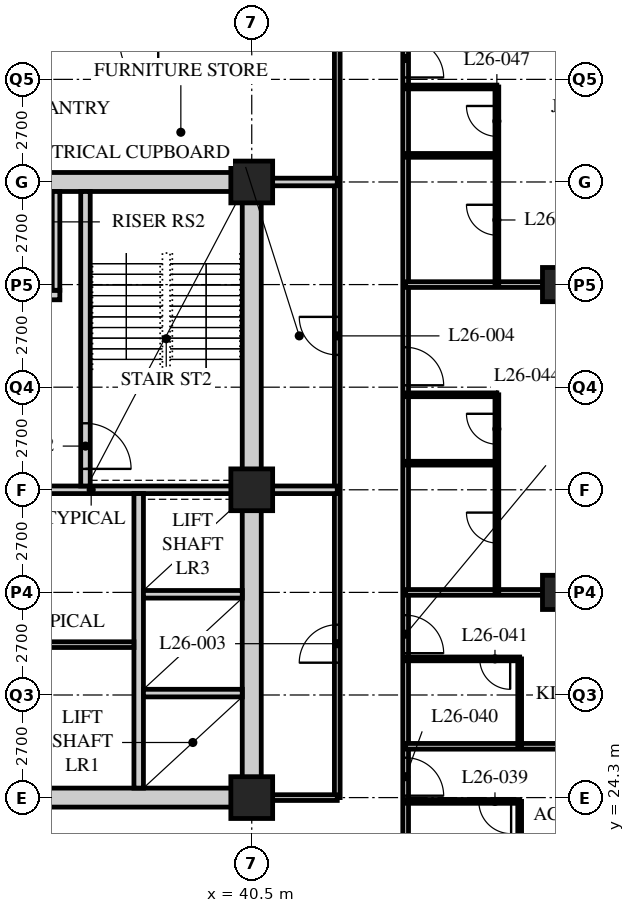
"""IFC4 building model, lengths in metres.
Left out: names, types, materials, properties, quantities, classifications, styles, units other than length and angle.
Written with IfcOpenShell. Run it as: python <this file> out.ifc"""

import sys

from ifc_helpers import new_model, si_unit, direction, frame, frame_2d, origin, origin_2d, place, context, subcontext, project, spatial, rectangle, hollow_rectangle, extrude, element, fill, save


model = new_model("IFC4")
c1 = context("Model", 3, precision=1e-05, world=origin(), true_north=direction((0.0, 1.0)))
c2 = subcontext(c1, "Body", "Model", "MODEL_VIEW")
j1 = project(units=[si_unit("LENGTHUNIT", "METRE"), si_unit("PLANEANGLEUNIT", "RADIAN")], contexts=[c1])
p1 = place(None, origin())
s1 = spatial("IfcSite", under=j1, at=p1, CompositionType="ELEMENT")
p2 = place(p1, origin())
s2 = spatial("IfcBuilding", under=s1, at=p2, CompositionType="ELEMENT")
p3 = place(p2, frame((0.0, 0.0, 106.8)))
s3 = spatial("IfcBuildingStorey", under=s2, at=p3, CompositionType="ELEMENT", Elevation=106.8)
for number, where, z_axis, x_axis in (
    (1, (40.5, 24.3, 0.0), (0.0, 0.0, 1.0), (1.0, 0.0, 0.0)),
    (2, (40.5, 32.4, 0.0), (0.0, 0.0, 1.0), (1.0, 0.0, 0.0)),
    (3, (40.5, 40.5, 0.0), (0.0, 0.0, 1.0), (1.0, 0.0, 0.0)),
):
    element("IfcColumn", number, at=place(p3, frame(where, z_axis=z_axis, x_axis=x_axis)), inside=s3, PredefinedType="COLUMN", context=c2, shape_type="SweptSolid", body=[
        extrude(hollow_rectangle(XDim=1.1, YDim=1.1, WallThickness=0.1, at=origin_2d()), origin(), (0.0, 0.0, 1.0), 3.4),
    ])
for number, where, z_axis, x_axis in (
    (4, (48.6, 29.7, 0.0), (0.0, 0.0, 1.0), (1.0, 0.0, 0.0)),
    (5, (48.6, 37.8, 0.0), (0.0, 0.0, 1.0), (1.0, 0.0, 0.0)),
):
    element("IfcColumn", number, at=place(p3, frame(where, z_axis=z_axis, x_axis=x_axis)), inside=s3, PredefinedType="COLUMN", context=c2, shape_type="SweptSolid", body=[
        extrude(hollow_rectangle(XDim=0.9, YDim=0.9, WallThickness=0.09, at=origin_2d()), origin(), (0.0, 0.0, 1.0), 3.4),
    ])
p4 = place(p3, frame((44.55, 21.6, 0.0), z_axis=(0.0, 0.0, 1.0), x_axis=(0.0, 1.0, 0.0)))
e6 = element("IfcWall", 6, at=p4, inside=s3, PredefinedType="PARTITIONING", context=c2, shape_type="SweptSolid", body=[
    extrude(rectangle(XDim=24.3, YDim=0.15, at=frame_2d((12.15, 0.0))), origin(), (0.0, 0.0, 1.0), 3.19),
])
p5 = place(p4, frame((2.75, 0.0, 0.0)))
e7 = element("IfcOpeningElement", 7, at=p5, cuts=e6, PredefinedType="OPENING", context=c2, shape_type="SweptSolid", body=[
    extrude(rectangle(XDim=1.0, YDim=2.1, at=frame_2d((0.5, 1.05))), frame((0.0, 0.085, 0.0), z_axis=(0.0, -1.0, 0.0), x_axis=(1.0, 0.0, 0.0)), (0.0, 0.0, 1.0), 0.17),
])
p6 = place(p4, frame((6.5, 0.0, 0.0)))
e8 = element("IfcOpeningElement", 8, at=p6, cuts=e6, PredefinedType="OPENING", context=c2, shape_type="SweptSolid", body=[
    extrude(rectangle(XDim=1.0, YDim=2.1, at=frame_2d((0.5, 1.05))), frame((0.0, 0.085, 0.0), z_axis=(0.0, -1.0, 0.0), x_axis=(1.0, 0.0, 0.0)), (0.0, 0.0, 1.0), 0.17),
])
p7 = place(p4, frame((13.55, 0.0, 0.0)))
e9 = element("IfcOpeningElement", 9, at=p7, cuts=e6, PredefinedType="OPENING", context=c2, shape_type="SweptSolid", body=[
    extrude(rectangle(XDim=1.0, YDim=2.1, at=frame_2d((0.5, 1.05))), frame((0.0, 0.085, 0.0), z_axis=(0.0, -1.0, 0.0), x_axis=(1.0, 0.0, 0.0)), (0.0, 0.0, 1.0), 0.17),
])
p8 = place(p4, frame((21.65, 0.0, 0.0)))
e10 = element("IfcOpeningElement", 10, at=p8, cuts=e6, PredefinedType="OPENING", context=c2, shape_type="SweptSolid", body=[
    extrude(rectangle(XDim=1.0, YDim=2.1, at=frame_2d((0.5, 1.05))), frame((0.0, 0.085, 0.0), z_axis=(0.0, -1.0, 0.0), x_axis=(1.0, 0.0, 0.0)), (0.0, 0.0, 1.0), 0.17),
])
p9 = place(p3, frame((42.75, 24.3, 0.0), z_axis=(0.0, 0.0, 1.0), x_axis=(0.0, 1.0, 0.0)))
e11 = element("IfcWall", 11, at=p9, inside=s3, PredefinedType="PARTITIONING", context=c2, shape_type="SweptSolid", body=[
    extrude(rectangle(XDim=19.8, YDim=0.15, at=frame_2d((9.9, 0.0))), origin(), (0.0, 0.0, 1.0), 3.19),
])
p10 = place(p9, frame((3.55, 0.0, 0.0)))
e12 = element("IfcOpeningElement", 12, at=p10, cuts=e11, PredefinedType="OPENING", context=c2, shape_type="SweptSolid", body=[
    extrude(rectangle(XDim=1.0, YDim=2.1, at=frame_2d((0.5, 1.05))), frame((0.0, 0.085, 0.0), z_axis=(0.0, -1.0, 0.0), x_axis=(1.0, 0.0, 0.0)), (0.0, 0.0, 1.0), 0.17),
])
p11 = place(p9, frame((11.65, 0.0, 0.0)))
e13 = element("IfcOpeningElement", 13, at=p11, cuts=e11, PredefinedType="OPENING", context=c2, shape_type="SweptSolid", body=[
    extrude(rectangle(XDim=1.0, YDim=2.1, at=frame_2d((0.5, 1.05))), frame((0.0, 0.085, 0.0), z_axis=(0.0, -1.0, 0.0), x_axis=(1.0, 0.0, 0.0)), (0.0, 0.0, 1.0), 0.17),
])
p12 = place(p3, frame((40.7, 24.3, 0.0), z_axis=(0.0, 0.0, 1.0), x_axis=(1.0, 0.0, 0.0)))
e14 = element("IfcWall", 14, at=p12, inside=s3, PredefinedType="PARTITIONING", context=c2, shape_type="SweptSolid", body=[
    extrude(rectangle(XDim=2.05, YDim=0.15, at=frame_2d((1.025, 0.0))), origin(), (0.0, 0.0, 1.0), 3.19),
])
for number, where, z_axis, x_axis in (
    (15, (40.5, 32.4, 0.0), (0.0, 0.0, 1.0), (1.0, 0.0, 0.0)),
    (16, (40.5, 40.5, 0.0), (0.0, 0.0, 1.0), (1.0, 0.0, 0.0)),
):
    element("IfcWall", number, at=place(p3, frame(where, z_axis=z_axis, x_axis=x_axis)), inside=s3, PredefinedType="SOLIDWALL", context=c2, shape_type="SweptSolid", body=[
        extrude(rectangle(XDim=2.25, YDim=0.2, at=frame_2d((1.125, 0.0))), origin(), (0.0, 0.0, 1.0), 3.19),
    ])
p13 = place(p3, frame((47.55, 21.6, 0.0), z_axis=(0.0, 0.0, 1.0), x_axis=(0.0, 1.0, 0.0)))
e17 = element("IfcWall", 17, at=p13, inside=s3, PredefinedType="PARTITIONING", context=c2, shape_type="SweptSolid", body=[
    extrude(rectangle(XDim=2.6, YDim=0.1, at=frame_2d((1.3, 0.0))), origin(), (0.0, 0.0, 1.0), 3.19),
])
p14 = place(p3, frame((44.55, 24.2, 0.0), z_axis=(0.0, 0.0, 1.0), x_axis=(1.0, 0.0, 0.0)))
e18 = element("IfcWall", 18, at=p14, inside=s3, PredefinedType="PARTITIONING", context=c2, shape_type="SweptSolid", body=[
    extrude(rectangle(XDim=3.0, YDim=0.1, at=frame_2d((1.5, 0.0))), origin(), (0.0, 0.0, 1.0), 3.19),
])
p15 = place(p14, frame((1.925, 0.0, 0.0)))
e19 = element("IfcOpeningElement", 19, at=p15, cuts=e18, PredefinedType="OPENING", context=c2, shape_type="SweptSolid", body=[
    extrude(rectangle(XDim=0.85, YDim=2.1, at=frame_2d((0.425, 1.05))), frame((0.0, 0.06, 0.0), z_axis=(0.0, -1.0, 0.0), x_axis=(1.0, 0.0, 0.0)), (0.0, 0.0, 1.0), 0.12),
])
p16 = place(p3, frame((44.55, 25.65, 0.0), z_axis=(0.0, 0.0, 1.0), x_axis=(1.0, 0.0, 0.0)))
e20 = element("IfcWall", 20, at=p16, inside=s3, PredefinedType="PARTITIONING", context=c2, shape_type="SweptSolid", body=[
    extrude(rectangle(XDim=11.85, YDim=0.15, at=frame_2d((5.925, 0.0))), origin(), (0.0, 0.0, 1.0), 3.19),
])
p17 = place(p3, frame((47.55, 25.65, 0.0), z_axis=(0.0, 0.0, 1.0), x_axis=(0.0, 1.0, 0.0)))
e21 = element("IfcWall", 21, at=p17, inside=s3, PredefinedType="PARTITIONING", context=c2, shape_type="SweptSolid", body=[
    extrude(rectangle(XDim=2.3, YDim=0.1, at=frame_2d((1.15, 0.0))), origin(), (0.0, 0.0, 1.0), 3.19),
])
p18 = place(p3, frame((44.55, 27.95, 0.0), z_axis=(0.0, 0.0, 1.0), x_axis=(1.0, 0.0, 0.0)))
e22 = element("IfcWall", 22, at=p18, inside=s3, PredefinedType="PARTITIONING", context=c2, shape_type="SweptSolid", body=[
    extrude(rectangle(XDim=3.0, YDim=0.1, at=frame_2d((1.5, 0.0))), origin(), (0.0, 0.0, 1.0), 3.19),
])
p19 = place(p18, frame((1.95, 0.0, 0.0)))
e23 = element("IfcOpeningElement", 23, at=p19, cuts=e22, PredefinedType="OPENING", context=c2, shape_type="SweptSolid", body=[
    extrude(rectangle(XDim=0.8, YDim=2.1, at=frame_2d((0.4, 1.05))), frame((0.0, 0.06, 0.0), z_axis=(0.0, -1.0, 0.0), x_axis=(1.0, 0.0, 0.0)), (0.0, 0.0, 1.0), 0.12),
])
p20 = place(p3, frame((44.55, 29.7, 0.0), z_axis=(0.0, 0.0, 1.0), x_axis=(1.0, 0.0, 0.0)))
e24 = element("IfcWall", 24, at=p20, inside=s3, PredefinedType="PARTITIONING", context=c2, shape_type="SweptSolid", body=[
    extrude(rectangle(XDim=11.85, YDim=0.15, at=frame_2d((5.925, 0.0))), origin(), (0.0, 0.0, 1.0), 2.578),
])
p21 = place(p3, frame((46.95, 29.7, 0.0), z_axis=(0.0, 0.0, 1.0), x_axis=(0.0, 1.0, 0.0)))
e25 = element("IfcWall", 25, at=p21, inside=s3, PredefinedType="PARTITIONING", context=c2, shape_type="SweptSolid", body=[
    extrude(rectangle(XDim=5.2, YDim=0.1, at=frame_2d((2.6, 0.0))), origin(), (0.0, 0.0, 1.0), 3.19),
])
p22 = place(p21, frame((1.3, 0.0, 0.0)))
e26 = element("IfcOpeningElement", 26, at=p22, cuts=e25, PredefinedType="OPENING", context=c2, shape_type="SweptSolid", body=[
    extrude(rectangle(XDim=0.8, YDim=2.1, at=frame_2d((0.4, 1.05))), frame((0.0, 0.06, 0.0), z_axis=(0.0, -1.0, 0.0), x_axis=(1.0, 0.0, 0.0)), (0.0, 0.0, 1.0), 0.12),
])
p23 = place(p21, frame((3.9, 0.0, 0.0)))
e27 = element("IfcOpeningElement", 27, at=p23, cuts=e25, PredefinedType="OPENING", context=c2, shape_type="SweptSolid", body=[
    extrude(rectangle(XDim=0.8, YDim=2.1, at=frame_2d((0.4, 1.05))), frame((0.0, 0.06, 0.0), z_axis=(0.0, -1.0, 0.0), x_axis=(1.0, 0.0, 0.0)), (0.0, 0.0, 1.0), 0.12),
])
for number, where, z_axis, x_axis in (
    (28, (44.55, 33.1, 0.0), (0.0, 0.0, 1.0), (1.0, 0.0, 0.0)),
    (29, (44.55, 34.9, 0.0), (0.0, 0.0, 1.0), (1.0, 0.0, 0.0)),
):
    element("IfcWall", number, at=place(p3, frame(where, z_axis=z_axis, x_axis=x_axis)), inside=s3, PredefinedType="PARTITIONING", context=c2, shape_type="SweptSolid", body=[
        extrude(rectangle(XDim=2.4, YDim=0.1, at=frame_2d((1.2, 0.0))), origin(), (0.0, 0.0, 1.0), 3.19),
    ])
p24 = place(p3, frame((44.55, 37.8, 0.0), z_axis=(0.0, 0.0, 1.0), x_axis=(1.0, 0.0, 0.0)))
e30 = element("IfcWall", 30, at=p24, inside=s3, PredefinedType="PARTITIONING", context=c2, shape_type="SweptSolid", body=[
    extrude(rectangle(XDim=11.85, YDim=0.15, at=frame_2d((5.925, 0.0))), origin(), (0.0, 0.0, 1.0), 2.578),
])
p25 = place(p3, frame((46.95, 37.8, 0.0), z_axis=(0.0, 0.0, 1.0), x_axis=(0.0, 1.0, 0.0)))
e31 = element("IfcWall", 31, at=p25, inside=s3, PredefinedType="PARTITIONING", context=c2, shape_type="SweptSolid", body=[
    extrude(rectangle(XDim=5.2, YDim=0.1, at=frame_2d((2.6, 0.0))), origin(), (0.0, 0.0, 1.0), 3.19),
])
p26 = place(p25, frame((1.3, 0.0, 0.0)))
e32 = element("IfcOpeningElement", 32, at=p26, cuts=e31, PredefinedType="OPENING", context=c2, shape_type="SweptSolid", body=[
    extrude(rectangle(XDim=0.8, YDim=2.1, at=frame_2d((0.4, 1.05))), frame((0.0, 0.06, 0.0), z_axis=(0.0, -1.0, 0.0), x_axis=(1.0, 0.0, 0.0)), (0.0, 0.0, 1.0), 0.12),
])
p27 = place(p25, frame((3.9, 0.0, 0.0)))
e33 = element("IfcOpeningElement", 33, at=p27, cuts=e31, PredefinedType="OPENING", context=c2, shape_type="SweptSolid", body=[
    extrude(rectangle(XDim=0.8, YDim=2.1, at=frame_2d((0.4, 1.05))), frame((0.0, 0.06, 0.0), z_axis=(0.0, -1.0, 0.0), x_axis=(1.0, 0.0, 0.0)), (0.0, 0.0, 1.0), 0.12),
])
for number, where, z_axis, x_axis in (
    (34, (44.55, 41.2, 0.0), (0.0, 0.0, 1.0), (1.0, 0.0, 0.0)),
    (35, (44.55, 43.0, 0.0), (0.0, 0.0, 1.0), (1.0, 0.0, 0.0)),
):
    element("IfcWall", number, at=place(p3, frame(where, z_axis=z_axis, x_axis=x_axis)), inside=s3, PredefinedType="PARTITIONING", context=c2, shape_type="SweptSolid", body=[
        extrude(rectangle(XDim=2.4, YDim=0.1, at=frame_2d((1.2, 0.0))), origin(), (0.0, 0.0, 1.0), 3.19),
    ])
p28 = place(p3, frame((15.95, 24.3, 0.0), z_axis=(0.0, 0.0, 1.0), x_axis=(1.0, 0.0, 0.0)))
e36 = element("IfcWall", 36, at=p28, inside=s3, PredefinedType="SOLIDWALL", context=c2, shape_type="SweptSolid", body=[
    extrude(rectangle(XDim=24.8, YDim=0.5, at=frame_2d((12.4, 0.0))), origin(), (0.0, 0.0, 1.0), 2.54),
])
p29 = place(p28, frame((11.5, 0.0, 0.0)))
e37 = element("IfcOpeningElement", 37, at=p29, cuts=e36, PredefinedType="OPENING", context=c2, shape_type="SweptSolid", body=[
    extrude(rectangle(XDim=1.8, YDim=2.4, at=frame_2d((0.9, 1.2))), frame((0.0, 0.26, 0.0), z_axis=(0.0, -1.0, 0.0), x_axis=(1.0, 0.0, 0.0)), (0.0, 0.0, 1.0), 0.52),
])
p30 = place(p3, frame((15.95, 40.5, 0.0), z_axis=(0.0, 0.0, 1.0), x_axis=(1.0, 0.0, 0.0)))
e38 = element("IfcWall", 38, at=p30, inside=s3, PredefinedType="SOLIDWALL", context=c2, shape_type="SweptSolid", body=[
    extrude(rectangle(XDim=24.8, YDim=0.5, at=frame_2d((12.4, 0.0))), origin(), (0.0, 0.0, 1.0), 2.54),
])
p31 = place(p30, frame((11.5, 0.0, 0.0)))
e39 = element("IfcOpeningElement", 39, at=p31, cuts=e38, PredefinedType="OPENING", context=c2, shape_type="SweptSolid", body=[
    extrude(rectangle(XDim=1.8, YDim=2.4, at=frame_2d((0.9, 1.2))), frame((0.0, 0.26, 0.0), z_axis=(0.0, -1.0, 0.0), x_axis=(1.0, 0.0, 0.0)), (0.0, 0.0, 1.0), 0.52),
])
p32 = place(p3, frame((40.5, 24.55, 0.0), z_axis=(0.0, 0.0, 1.0), x_axis=(0.0, 1.0, 0.0)))
e40 = element("IfcWall", 40, at=p32, inside=s3, PredefinedType="SOLIDWALL", context=c2, shape_type="SweptSolid", body=[
    extrude(rectangle(XDim=15.7, YDim=0.5, at=frame_2d((7.85, 0.0))), origin(), (0.0, 0.0, 1.0), 2.578),
])
p33 = place(p3, frame((32.3, 32.4, 0.0), z_axis=(0.0, 0.0, 1.0), x_axis=(1.0, 0.0, 0.0)))
e41 = element("IfcWall", 41, at=p33, inside=s3, PredefinedType="SOLIDWALL", context=c2, shape_type="SweptSolid", body=[
    extrude(rectangle(XDim=7.95, YDim=0.2, at=frame_2d((3.975, 0.0))), origin(), (0.0, 0.0, 1.0), 2.578),
])
p34 = place(p3, frame((37.525, 24.55, 0.0), z_axis=(0.0, 0.0, 1.0), x_axis=(0.0, 1.0, 0.0)))
e42 = element("IfcWall", 42, at=p34, inside=s3, PredefinedType="SOLIDWALL", context=c2, shape_type="SweptSolid", body=[
    extrude(rectangle(XDim=7.75, YDim=0.25, at=frame_2d((3.875, 0.0))), origin(), (0.0, 0.0, 1.0), 3.19),
])
for number, where, z_axis, x_axis in (
    (43, (37.65, 27.05, 0.0), (0.0, 0.0, 1.0), (1.0, 0.0, 0.0)),
    (44, (37.65, 29.65, 0.0), (0.0, 0.0, 1.0), (1.0, 0.0, 0.0)),
):
    element("IfcWall", number, at=place(p3, frame(where, z_axis=z_axis, x_axis=x_axis)), inside=s3, PredefinedType="SOLIDWALL", context=c2, shape_type="SweptSolid", body=[
        extrude(rectangle(XDim=2.6, YDim=0.2, at=frame_2d((1.3, 0.0))), origin(), (0.0, 0.0, 1.0), 3.19),
    ])
p35 = place(p3, frame((36.125, 32.5, 0.0), z_axis=(0.0, 0.0, 1.0), x_axis=(0.0, 1.0, 0.0)))
e45 = element("IfcWall", 45, at=p35, inside=s3, PredefinedType="SOLIDWALL", context=c2, shape_type="SweptSolid", body=[
    extrude(rectangle(XDim=7.75, YDim=0.25, at=frame_2d((3.875, 0.0))), origin(), (0.0, 0.0, 1.0), 3.19),
])
p36 = place(p35, frame((0.45, 0.0, 0.0)))
e46 = element("IfcOpeningElement", 46, at=p36, cuts=e45, PredefinedType="OPENING", context=c2, shape_type="SweptSolid", body=[
    extrude(rectangle(XDim=1.2, YDim=2.1, at=frame_2d((0.6, 1.05))), frame((0.0, 0.135, 0.0), z_axis=(0.0, -1.0, 0.0), x_axis=(1.0, 0.0, 0.0)), (0.0, 0.0, 1.0), 0.27),
])
p37 = place(p3, frame((32.5, 37.525, 0.0), z_axis=(0.0, 0.0, 1.0), x_axis=(1.0, 0.0, 0.0)))
e47 = element("IfcWall", 47, at=p37, inside=s3, PredefinedType="SOLIDWALL", context=c2, shape_type="SweptSolid", body=[
    extrude(rectangle(XDim=2.95, YDim=0.25, at=frame_2d((1.475, 0.0))), origin(), (0.0, 0.0, 1.0), 3.19),
])
p38 = place(p37, frame((0.9, 0.0, 0.0)))
e48 = element("IfcOpeningElement", 48, at=p38, cuts=e47, PredefinedType="OPENING", context=c2, shape_type="SweptSolid", body=[
    extrude(rectangle(XDim=1.1, YDim=2.4, at=frame_2d((0.55, 1.2))), frame((0.0, 0.135, 0.0), z_axis=(0.0, -1.0, 0.0), x_axis=(1.0, 0.0, 0.0)), (0.0, 0.0, 1.0), 0.27),
])
p39 = place(p3, frame((35.35, 37.65, 0.0), z_axis=(0.0, 0.0, 1.0), x_axis=(0.0, 1.0, 0.0)))
e49 = element("IfcWall", 49, at=p39, inside=s3, PredefinedType="SOLIDWALL", context=c2, shape_type="SweptSolid", body=[
    extrude(rectangle(XDim=2.6, YDim=0.2, at=frame_2d((1.3, 0.0))), origin(), (0.0, 0.0, 1.0), 3.19),
])
p40 = place(p3, frame((32.5, 28.325, 0.0), z_axis=(0.0, 0.0, 1.0), x_axis=(1.0, 0.0, 0.0)))
e50 = element("IfcWall", 50, at=p40, inside=s3, PredefinedType="PARTITIONING", context=c2, shape_type="SweptSolid", body=[
    extrude(rectangle(XDim=4.9, YDim=0.15, at=frame_2d((2.45, 0.0))), origin(), (0.0, 0.0, 1.0), 3.19),
])
p41 = place(p10, origin())
e51 = element("IfcDoor", 51, at=p41, inside=s3, OperationType="SINGLE_SWING_LEFT", PredefinedType="DOOR", context=c2, shape_type="SweptSolid", body=[
    extrude(rectangle(XDim=1.0, YDim=2.1, at=frame_2d((0.5, 1.05))), frame((0.0, 0.025, 0.0), z_axis=(0.0, -1.0, 0.0), x_axis=(1.0, 0.0, 0.0)), (0.0, 0.0, 1.0), 0.05),
])
fill(e12, e51)
p42 = place(p11, origin())
e52 = element("IfcDoor", 52, at=p42, inside=s3, OperationType="SINGLE_SWING_RIGHT", PredefinedType="DOOR", context=c2, shape_type="SweptSolid", body=[
    extrude(rectangle(XDim=1.0, YDim=2.1, at=frame_2d((0.5, 1.05))), frame((0.0, 0.025, 0.0), z_axis=(0.0, -1.0, 0.0), x_axis=(1.0, 0.0, 0.0)), (0.0, 0.0, 1.0), 0.05),
])
fill(e13, e52)
p43 = place(p15, origin())
e53 = element("IfcDoor", 53, at=p43, inside=s3, OperationType="SINGLE_SWING_LEFT", PredefinedType="DOOR", context=c2, shape_type="SweptSolid", body=[
    extrude(rectangle(XDim=0.85, YDim=2.1, at=frame_2d((0.425, 1.05))), frame((0.0, 0.025, 0.0), z_axis=(0.0, -1.0, 0.0), x_axis=(1.0, 0.0, 0.0)), (0.0, 0.0, 1.0), 0.05),
])
fill(e19, e53)
p44 = place(p5, origin())
e54 = element("IfcDoor", 54, at=p44, inside=s3, OperationType="SINGLE_SWING_RIGHT", PredefinedType="DOOR", context=c2, shape_type="SweptSolid", body=[
    extrude(rectangle(XDim=1.0, YDim=2.1, at=frame_2d((0.5, 1.05))), frame((0.0, 0.025, 0.0), z_axis=(0.0, -1.0, 0.0), x_axis=(1.0, 0.0, 0.0)), (0.0, 0.0, 1.0), 0.05),
])
fill(e7, e54)
p45 = place(p19, origin())
e55 = element("IfcDoor", 55, at=p45, inside=s3, OperationType="SINGLE_SWING_LEFT", PredefinedType="DOOR", context=c2, shape_type="SweptSolid", body=[
    extrude(rectangle(XDim=0.8, YDim=2.1, at=frame_2d((0.4, 1.05))), frame((0.0, 0.025, 0.0), z_axis=(0.0, -1.0, 0.0), x_axis=(1.0, 0.0, 0.0)), (0.0, 0.0, 1.0), 0.05),
])
fill(e23, e55)
p46 = place(p6, origin())
e56 = element("IfcDoor", 56, at=p46, inside=s3, OperationType="SINGLE_SWING_RIGHT", PredefinedType="DOOR", context=c2, shape_type="SweptSolid", body=[
    extrude(rectangle(XDim=1.0, YDim=2.1, at=frame_2d((0.5, 1.05))), frame((0.0, 0.025, 0.0), z_axis=(0.0, -1.0, 0.0), x_axis=(1.0, 0.0, 0.0)), (0.0, 0.0, 1.0), 0.05),
])
fill(e8, e56)
p47 = place(p22, origin())
e57 = element("IfcDoor", 57, at=p47, inside=s3, OperationType="SINGLE_SWING_RIGHT", PredefinedType="DOOR", context=c2, shape_type="SweptSolid", body=[
    extrude(rectangle(XDim=0.8, YDim=2.1, at=frame_2d((0.4, 1.05))), frame((0.0, 0.025, 0.0), z_axis=(0.0, -1.0, 0.0), x_axis=(1.0, 0.0, 0.0)), (0.0, 0.0, 1.0), 0.05),
])
fill(e26, e57)
p48 = place(p23, origin())
e58 = element("IfcDoor", 58, at=p48, inside=s3, OperationType="SINGLE_SWING_RIGHT", PredefinedType="DOOR", context=c2, shape_type="SweptSolid", body=[
    extrude(rectangle(XDim=0.8, YDim=2.1, at=frame_2d((0.4, 1.05))), frame((0.0, 0.025, 0.0), z_axis=(0.0, -1.0, 0.0), x_axis=(1.0, 0.0, 0.0)), (0.0, 0.0, 1.0), 0.05),
])
fill(e27, e58)
p49 = place(p7, origin())
e59 = element("IfcDoor", 59, at=p49, inside=s3, OperationType="SINGLE_SWING_RIGHT", PredefinedType="DOOR", context=c2, shape_type="SweptSolid", body=[
    extrude(rectangle(XDim=1.0, YDim=2.1, at=frame_2d((0.5, 1.05))), frame((0.0, 0.025, 0.0), z_axis=(0.0, -1.0, 0.0), x_axis=(1.0, 0.0, 0.0)), (0.0, 0.0, 1.0), 0.05),
])
fill(e9, e59)
p50 = place(p26, origin())
e60 = element("IfcDoor", 60, at=p50, inside=s3, OperationType="SINGLE_SWING_RIGHT", PredefinedType="DOOR", context=c2, shape_type="SweptSolid", body=[
    extrude(rectangle(XDim=0.8, YDim=2.1, at=frame_2d((0.4, 1.05))), frame((0.0, 0.025, 0.0), z_axis=(0.0, -1.0, 0.0), x_axis=(1.0, 0.0, 0.0)), (0.0, 0.0, 1.0), 0.05),
])
fill(e32, e60)
p51 = place(p27, origin())
e61 = element("IfcDoor", 61, at=p51, inside=s3, OperationType="SINGLE_SWING_RIGHT", PredefinedType="DOOR", context=c2, shape_type="SweptSolid", body=[
    extrude(rectangle(XDim=0.8, YDim=2.1, at=frame_2d((0.4, 1.05))), frame((0.0, 0.025, 0.0), z_axis=(0.0, -1.0, 0.0), x_axis=(1.0, 0.0, 0.0)), (0.0, 0.0, 1.0), 0.05),
])
fill(e33, e61)
p52 = place(p8, origin())
e62 = element("IfcDoor", 62, at=p52, inside=s3, OperationType="SINGLE_SWING_RIGHT", PredefinedType="DOOR", context=c2, shape_type="SweptSolid", body=[
    extrude(rectangle(XDim=1.0, YDim=2.1, at=frame_2d((0.5, 1.05))), frame((0.0, 0.025, 0.0), z_axis=(0.0, -1.0, 0.0), x_axis=(1.0, 0.0, 0.0)), (0.0, 0.0, 1.0), 0.05),
])
fill(e10, e62)
p53 = place(p36, origin())
e63 = element("IfcDoor", 63, at=p53, inside=s3, OperationType="SINGLE_SWING_RIGHT", PredefinedType="DOOR", context=c2, shape_type="SweptSolid", body=[
    extrude(rectangle(XDim=1.2, YDim=2.1, at=frame_2d((0.6, 1.05))), frame((0.0, 0.025, 0.0), z_axis=(0.0, -1.0, 0.0), x_axis=(1.0, 0.0, 0.0)), (0.0, 0.0, 1.0), 0.05),
])
fill(e46, e63)
save(model, sys.argv[1])
